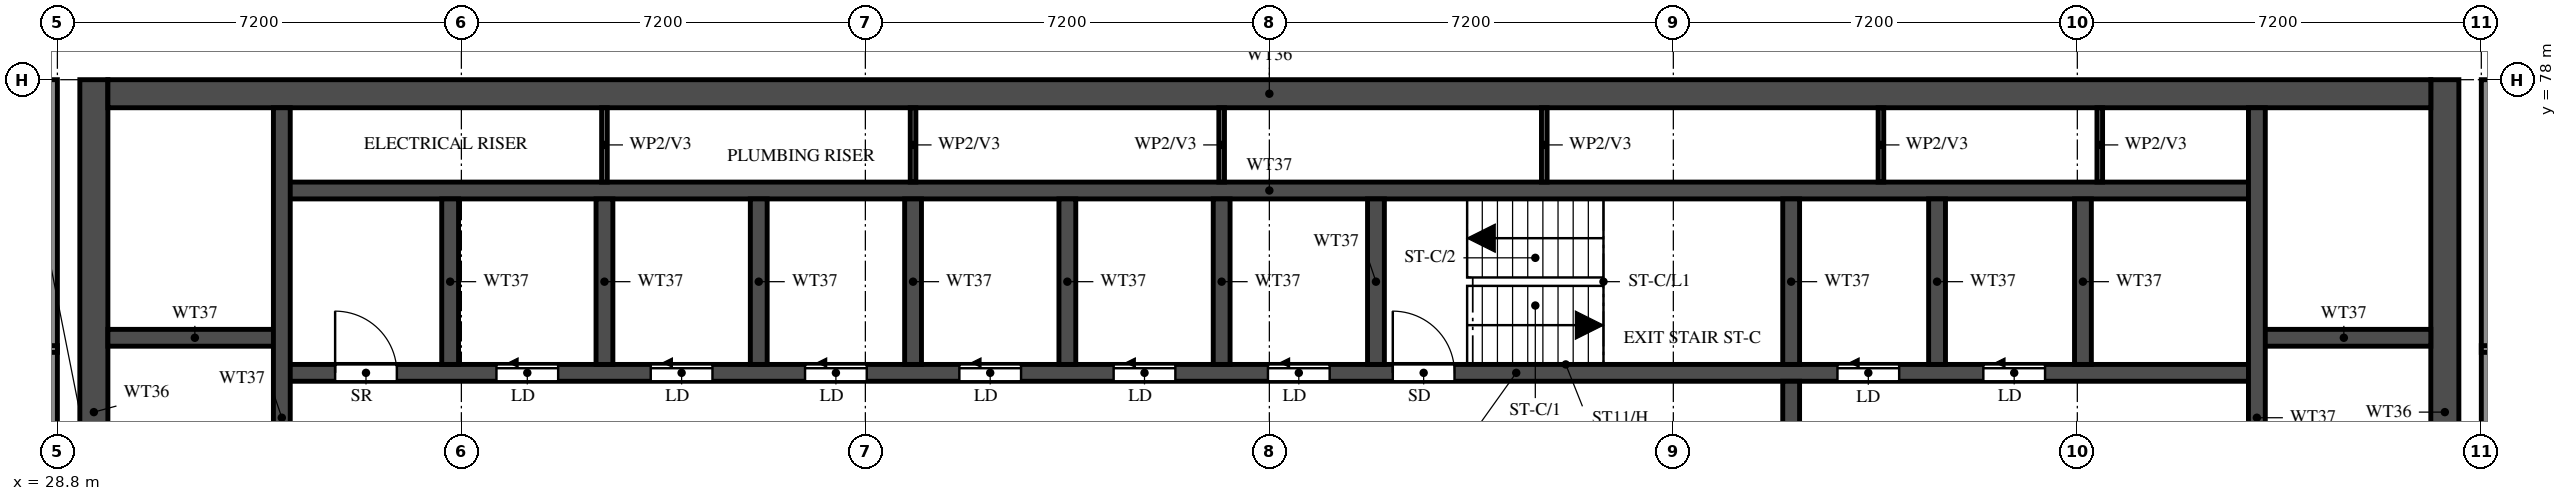
"""IFC4 building model, lengths in metres.
Left out: names, types, materials, properties, quantities, classifications, styles, units other than length and angle.
Written with IfcOpenShell. Run it as: python <this file> out.ifc"""

import sys

from ifc_helpers import new_model, si_unit, direction, frame, frame_2d, origin, place, context, subcontext, project, spatial, rectangle, extrude, element, fill, save


model = new_model("IFC4")
c1 = context("Model", 3, precision=1e-05, world=origin(), true_north=direction((0.0, 1.0)))
c2 = subcontext(c1, "Body", "Model", "MODEL_VIEW")
j1 = project(units=[si_unit("LENGTHUNIT", "METRE"), si_unit("PLANEANGLEUNIT", "RADIAN")], contexts=[c1])
p1 = place(None, origin())
s1 = spatial("IfcSite", under=j1, at=p1, CompositionType="ELEMENT")
p2 = place(p1, origin())
s2 = spatial("IfcBuilding", under=s1, at=p2, CompositionType="ELEMENT")
p3 = place(p2, frame((0.0, 0.0, 257.0)))
s3 = spatial("IfcBuildingStorey", under=s2, at=p3, CompositionType="ELEMENT", Elevation=257.0)
for number, where, z_axis, x_axis in (
    (1, (29.45, 66.15, 0.0), (0.0, 0.0, 1.0), (0.0, 1.0, 0.0)),
    (2, (71.35, 66.15, 0.0), (0.0, 0.0, 1.0), (0.0, 1.0, 0.0)),
):
    element("IfcWall", number, at=place(p3, frame(where, z_axis=z_axis, x_axis=x_axis)), inside=s3, PredefinedType="SHEAR", context=c2, shape_type="SweptSolid", body=[
        extrude(rectangle(XDim=11.85, YDim=0.5, at=frame_2d((5.925, 0.0))), origin(), (0.0, 0.0, 1.0), 3.22),
    ])
p4 = place(p3, frame((29.7, 77.75, 0.0), z_axis=(0.0, 0.0, 1.0), x_axis=(1.0, 0.0, 0.0)))
e3 = element("IfcWall", 3, at=p4, inside=s3, PredefinedType="SHEAR", context=c2, shape_type="SweptSolid", body=[
    extrude(rectangle(XDim=41.4, YDim=0.5, at=frame_2d((20.7, 0.0))), origin(), (0.0, 0.0, 1.0), 3.22),
])
p5 = place(p3, frame((32.8, 72.775, 0.0), z_axis=(0.0, 0.0, 1.0), x_axis=(1.0, 0.0, 0.0)))
e4 = element("IfcWall", 4, at=p5, inside=s3, PredefinedType="SHEAR", context=c2, shape_type="SweptSolid", body=[
    extrude(rectangle(XDim=35.2, YDim=0.3, at=frame_2d((17.6, 0.0))), origin(), (0.0, 0.0, 1.0), 3.22),
])
p6 = place(p5, frame((19.8, 0.0, 0.0)))
e5 = element("IfcOpeningElement", 5, at=p6, cuts=e4, PredefinedType="OPENING", context=c2, shape_type="SweptSolid", body=[
    extrude(rectangle(XDim=1.1, YDim=2.1, at=frame_2d((0.55, 1.05))), frame((0.0, 0.16, 0.0), z_axis=(0.0, -1.0, 0.0), x_axis=(1.0, 0.0, 0.0)), (0.0, 0.0, 1.0), 0.32),
])
p7 = place(p5, frame((27.725, 0.0, 0.0)))
e6 = element("IfcOpeningElement", 6, at=p7, cuts=e4, PredefinedType="OPENING", context=c2, shape_type="SweptSolid", body=[
    extrude(rectangle(XDim=1.1, YDim=2.1, at=frame_2d((0.55, 1.05))), frame((0.0, 0.16, 0.0), z_axis=(0.0, -1.0, 0.0), x_axis=(1.0, 0.0, 0.0)), (0.0, 0.0, 1.0), 0.32),
])
p8 = place(p5, frame((30.325, 0.0, 0.0)))
e7 = element("IfcOpeningElement", 7, at=p8, cuts=e4, PredefinedType="OPENING", context=c2, shape_type="SweptSolid", body=[
    extrude(rectangle(XDim=1.1, YDim=2.1, at=frame_2d((0.55, 1.05))), frame((0.0, 0.16, 0.0), z_axis=(0.0, -1.0, 0.0), x_axis=(1.0, 0.0, 0.0)), (0.0, 0.0, 1.0), 0.32),
])
p9 = place(p5, frame((3.825, 0.0, 0.0)))
e8 = element("IfcOpeningElement", 8, at=p9, cuts=e4, PredefinedType="OPENING", context=c2, shape_type="SweptSolid", body=[
    extrude(rectangle(XDim=1.1, YDim=2.1, at=frame_2d((0.55, 1.05))), frame((0.0, 0.16, 0.0), z_axis=(0.0, -1.0, 0.0), x_axis=(1.0, 0.0, 0.0)), (0.0, 0.0, 1.0), 0.32),
])
p10 = place(p5, frame((6.575, 0.0, 0.0)))
e9 = element("IfcOpeningElement", 9, at=p10, cuts=e4, PredefinedType="OPENING", context=c2, shape_type="SweptSolid", body=[
    extrude(rectangle(XDim=1.1, YDim=2.1, at=frame_2d((0.55, 1.05))), frame((0.0, 0.16, 0.0), z_axis=(0.0, -1.0, 0.0), x_axis=(1.0, 0.0, 0.0)), (0.0, 0.0, 1.0), 0.32),
])
p11 = place(p5, frame((9.325, 0.0, 0.0)))
e10 = element("IfcOpeningElement", 10, at=p11, cuts=e4, PredefinedType="OPENING", context=c2, shape_type="SweptSolid", body=[
    extrude(rectangle(XDim=1.1, YDim=2.1, at=frame_2d((0.55, 1.05))), frame((0.0, 0.16, 0.0), z_axis=(0.0, -1.0, 0.0), x_axis=(1.0, 0.0, 0.0)), (0.0, 0.0, 1.0), 0.32),
])
p12 = place(p5, frame((12.075, 0.0, 0.0)))
e11 = element("IfcOpeningElement", 11, at=p12, cuts=e4, PredefinedType="OPENING", context=c2, shape_type="SweptSolid", body=[
    extrude(rectangle(XDim=1.1, YDim=2.1, at=frame_2d((0.55, 1.05))), frame((0.0, 0.16, 0.0), z_axis=(0.0, -1.0, 0.0), x_axis=(1.0, 0.0, 0.0)), (0.0, 0.0, 1.0), 0.32),
])
p13 = place(p5, frame((14.825, 0.0, 0.0)))
e12 = element("IfcOpeningElement", 12, at=p13, cuts=e4, PredefinedType="OPENING", context=c2, shape_type="SweptSolid", body=[
    extrude(rectangle(XDim=1.1, YDim=2.1, at=frame_2d((0.55, 1.05))), frame((0.0, 0.16, 0.0), z_axis=(0.0, -1.0, 0.0), x_axis=(1.0, 0.0, 0.0)), (0.0, 0.0, 1.0), 0.32),
])
p14 = place(p5, frame((17.575, 0.0, 0.0)))
e13 = element("IfcOpeningElement", 13, at=p14, cuts=e4, PredefinedType="OPENING", context=c2, shape_type="SweptSolid", body=[
    extrude(rectangle(XDim=1.1, YDim=2.1, at=frame_2d((0.55, 1.05))), frame((0.0, 0.16, 0.0), z_axis=(0.0, -1.0, 0.0), x_axis=(1.0, 0.0, 0.0)), (0.0, 0.0, 1.0), 0.32),
])
p15 = place(p5, frame((0.95, 0.0, 0.0)))
e14 = element("IfcOpeningElement", 14, at=p15, cuts=e4, PredefinedType="OPENING", context=c2, shape_type="SweptSolid", body=[
    extrude(rectangle(XDim=1.1, YDim=2.1, at=frame_2d((0.55, 1.05))), frame((0.0, 0.16, 0.0), z_axis=(0.0, -1.0, 0.0), x_axis=(1.0, 0.0, 0.0)), (0.0, 0.0, 1.0), 0.32),
])
p16 = place(p3, frame((32.8, 76.025, 0.0), z_axis=(0.0, 0.0, 1.0), x_axis=(1.0, 0.0, 0.0)))
e15 = element("IfcWall", 15, at=p16, inside=s3, PredefinedType="SHEAR", context=c2, shape_type="SweptSolid", body=[
    extrude(rectangle(XDim=35.2, YDim=0.3, at=frame_2d((17.6, 0.0))), origin(), (0.0, 0.0, 1.0), 3.22),
])
for number, where, z_axis, x_axis in (
    (16, (29.7, 73.4, 0.0), (0.0, 0.0, 1.0), (1.0, 0.0, 0.0)),
    (17, (68.0, 73.4, 0.0), (0.0, 0.0, 1.0), (1.0, 0.0, 0.0)),
):
    element("IfcWall", number, at=place(p3, frame(where, z_axis=z_axis, x_axis=x_axis)), inside=s3, PredefinedType="SHEAR", context=c2, shape_type="SweptSolid", body=[
        extrude(rectangle(XDim=3.1, YDim=0.3, at=frame_2d((1.55, 0.0))), origin(), (0.0, 0.0, 1.0), 3.22),
    ])
p17 = place(p3, frame((32.8, 66.45, 0.0), z_axis=(0.0, 0.0, 1.0), x_axis=(0.0, 1.0, 0.0)))
e18 = element("IfcWall", 18, at=p17, inside=s3, PredefinedType="SHEAR", context=c2, shape_type="SweptSolid", body=[
    extrude(rectangle(XDim=11.05, YDim=0.3, at=frame_2d((5.525, 0.0))), origin(), (0.0, 0.0, 1.0), 3.22),
])
p18 = place(p3, frame((68.0, 66.45, 0.0), z_axis=(0.0, 0.0, 1.0), x_axis=(0.0, 1.0, 0.0)))
e19 = element("IfcWall", 19, at=p18, inside=s3, PredefinedType="SHEAR", context=c2, shape_type="SweptSolid", body=[
    extrude(rectangle(XDim=11.05, YDim=0.3, at=frame_2d((5.525, 0.0))), origin(), (0.0, 0.0, 1.0), 3.22),
])
p19 = place(p18, frame((0.15, 0.0, 0.0)))
e20 = element("IfcOpeningElement", 20, at=p19, cuts=e19, PredefinedType="OPENING", context=c2, shape_type="SweptSolid", body=[
    extrude(rectangle(XDim=1.1, YDim=2.1, at=frame_2d((0.55, 1.05))), frame((0.0, 0.16, 0.0), z_axis=(0.0, -1.0, 0.0), x_axis=(1.0, 0.0, 0.0)), (0.0, 0.0, 1.0), 0.32),
])
p20 = place(p3, frame((59.7, 66.45, 0.0), z_axis=(0.0, 0.0, 1.0), x_axis=(0.0, 1.0, 0.0)))
e21 = element("IfcWall", 21, at=p20, inside=s3, PredefinedType="SHEAR", context=c2, shape_type="SweptSolid", body=[
    extrude(rectangle(XDim=6.175, YDim=0.3, at=frame_2d((3.087, 0.0))), origin(), (0.0, 0.0, 1.0), 3.22),
])
p21 = place(p20, frame((3.85, 0.0, 0.0)))
e22 = element("IfcOpeningElement", 22, at=p21, cuts=e21, PredefinedType="OPENING", context=c2, shape_type="SweptSolid", body=[
    extrude(rectangle(XDim=1.2, YDim=2.1, at=frame_2d((0.6, 1.05))), frame((0.0, 0.16, 0.0), z_axis=(0.0, -1.0, 0.0), x_axis=(1.0, 0.0, 0.0)), (0.0, 0.0, 1.0), 0.32),
])
for number, where, z_axis, x_axis in (
    (23, (59.7, 72.925, 0.0), (0.0, 0.0, 1.0), (0.0, 1.0, 0.0)),
    (24, (35.8, 72.925, 0.0), (0.0, 0.0, 1.0), (0.0, 1.0, 0.0)),
    (25, (38.55, 72.925, 0.0), (0.0, 0.0, 1.0), (0.0, 1.0, 0.0)),
    (26, (41.3, 72.925, 0.0), (0.0, 0.0, 1.0), (0.0, 1.0, 0.0)),
    (27, (44.05, 72.925, 0.0), (0.0, 0.0, 1.0), (0.0, 1.0, 0.0)),
    (28, (46.8, 72.925, 0.0), (0.0, 0.0, 1.0), (0.0, 1.0, 0.0)),
    (29, (49.55, 72.925, 0.0), (0.0, 0.0, 1.0), (0.0, 1.0, 0.0)),
    (30, (52.3, 72.925, 0.0), (0.0, 0.0, 1.0), (0.0, 1.0, 0.0)),
    (31, (62.3, 72.925, 0.0), (0.0, 0.0, 1.0), (0.0, 1.0, 0.0)),
    (32, (64.9, 72.925, 0.0), (0.0, 0.0, 1.0), (0.0, 1.0, 0.0)),
):
    element("IfcWall", number, at=place(p3, frame(where, z_axis=z_axis, x_axis=x_axis)), inside=s3, PredefinedType="SHEAR", context=c2, shape_type="SweptSolid", body=[
        extrude(rectangle(XDim=2.95, YDim=0.3, at=frame_2d((1.475, 0.0))), origin(), (0.0, 0.0, 1.0), 3.22),
    ])
for number, where, z_axis, x_axis in (
    (33, (38.55, 76.175, 0.0), (0.0, 0.0, 1.0), (0.0, 1.0, 0.0)),
    (34, (44.05, 76.175, 0.0), (0.0, 0.0, 1.0), (0.0, 1.0, 0.0)),
    (35, (49.55, 76.175, 0.0), (0.0, 0.0, 1.0), (0.0, 1.0, 0.0)),
    (36, (55.3, 76.175, 0.0), (0.0, 0.0, 1.0), (0.0, 1.0, 0.0)),
    (37, (61.3, 76.175, 0.0), (0.0, 0.0, 1.0), (0.0, 1.0, 0.0)),
    (38, (65.2, 76.175, 0.0), (0.0, 0.0, 1.0), (0.0, 1.0, 0.0)),
):
    element("IfcWall", number, at=place(p3, frame(where, z_axis=z_axis, x_axis=x_axis)), inside=s3, PredefinedType="PARTITIONING", context=c2, shape_type="SweptSolid", body=[
        extrude(rectangle(XDim=1.325, YDim=0.1, at=frame_2d((0.663, 0.0))), origin(), (0.0, 0.0, 1.0), 3.22),
    ])
for number, where, z_axis, x_axis in (
    (39, (28.7, 62.4, 0.0), (0.0, 0.0, 1.0), (0.0, 1.0, 0.0)),
    (40, (72.1, 62.4, 0.0), (0.0, 0.0, 1.0), (0.0, 1.0, 0.0)),
):
    element("IfcWall", number, at=place(p3, frame(where, z_axis=z_axis, x_axis=x_axis)), inside=s3, PredefinedType="SOLIDWALL", context=c2, shape_type="SweptSolid", body=[
        extrude(rectangle(XDim=15.6, YDim=0.2, at=frame_2d((7.8, 0.0))), origin(), (0.0, 0.0, 1.0), 3.22),
    ])
p22 = place(p3, frame((18.525, 73.2, 0.0), z_axis=(0.0, 0.0, 1.0), x_axis=(1.0, 0.0, 0.0)))
e41 = element("IfcWall", 41, at=p22, inside=s3, PredefinedType="PARTITIONING", context=c2, shape_type="SweptSolid", body=[
    extrude(rectangle(XDim=10.275, YDim=0.12, at=frame_2d((5.138, 0.0))), origin(), (0.0, 0.0, 1.0), 2.32),
])
p23 = place(p22, frame((5.275, 0.0, 0.0)))
e42 = element("IfcOpeningElement", 42, at=p23, cuts=e41, PredefinedType="OPENING", context=c2, shape_type="SweptSolid", body=[
    extrude(rectangle(XDim=0.9, YDim=2.1, at=frame_2d((0.45, 1.05))), frame((0.0, 0.07, 0.0), z_axis=(0.0, -1.0, 0.0), x_axis=(1.0, 0.0, 0.0)), (0.0, 0.0, 1.0), 0.14),
])
p24 = place(p3, frame((72.0, 73.2, 0.0), z_axis=(0.0, 0.0, 1.0), x_axis=(1.0, 0.0, 0.0)))
e43 = element("IfcWall", 43, at=p24, inside=s3, PredefinedType="PARTITIONING", context=c2, shape_type="SweptSolid", body=[
    extrude(rectangle(XDim=10.275, YDim=0.12, at=frame_2d((5.137, 0.0))), origin(), (0.0, 0.0, 1.0), 2.32),
])
p25 = place(p24, frame((4.1, 0.0, 0.0)))
e44 = element("IfcOpeningElement", 44, at=p25, cuts=e43, PredefinedType="OPENING", context=c2, shape_type="SweptSolid", body=[
    extrude(rectangle(XDim=0.9, YDim=2.1, at=frame_2d((0.45, 1.05))), frame((0.0, 0.07, 0.0), z_axis=(0.0, -1.0, 0.0), x_axis=(1.0, 0.0, 0.0)), (0.0, 0.0, 1.0), 0.14),
])
p26 = place(p6, origin())
e45 = element("IfcDoor", 45, at=p26, inside=s3, OperationType="SINGLE_SWING_LEFT", PredefinedType="DOOR", context=c2, shape_type="SweptSolid", body=[
    extrude(rectangle(XDim=1.1, YDim=2.1, at=frame_2d((0.55, 1.05))), frame((0.0, 0.025, 0.0), z_axis=(0.0, -1.0, 0.0), x_axis=(1.0, 0.0, 0.0)), (0.0, 0.0, 1.0), 0.05),
])
fill(e5, e45)
p27 = place(p7, origin())
e46 = element("IfcDoor", 46, at=p27, inside=s3, OperationType="SLIDING_TO_LEFT", PredefinedType="DOOR", context=c2, shape_type="SweptSolid", body=[
    extrude(rectangle(XDim=1.1, YDim=2.1, at=frame_2d((0.55, 1.05))), frame((0.0, 0.025, 0.0), z_axis=(0.0, -1.0, 0.0), x_axis=(1.0, 0.0, 0.0)), (0.0, 0.0, 1.0), 0.05),
])
fill(e6, e46)
p28 = place(p8, origin())
e47 = element("IfcDoor", 47, at=p28, inside=s3, OperationType="SLIDING_TO_LEFT", PredefinedType="DOOR", context=c2, shape_type="SweptSolid", body=[
    extrude(rectangle(XDim=1.1, YDim=2.1, at=frame_2d((0.55, 1.05))), frame((0.0, 0.025, 0.0), z_axis=(0.0, -1.0, 0.0), x_axis=(1.0, 0.0, 0.0)), (0.0, 0.0, 1.0), 0.05),
])
fill(e7, e47)
p29 = place(p9, origin())
e48 = element("IfcDoor", 48, at=p29, inside=s3, OperationType="SLIDING_TO_LEFT", PredefinedType="DOOR", context=c2, shape_type="SweptSolid", body=[
    extrude(rectangle(XDim=1.1, YDim=2.1, at=frame_2d((0.55, 1.05))), frame((0.0, 0.025, 0.0), z_axis=(0.0, -1.0, 0.0), x_axis=(1.0, 0.0, 0.0)), (0.0, 0.0, 1.0), 0.05),
])
fill(e8, e48)
p30 = place(p10, origin())
e49 = element("IfcDoor", 49, at=p30, inside=s3, OperationType="SLIDING_TO_LEFT", PredefinedType="DOOR", context=c2, shape_type="SweptSolid", body=[
    extrude(rectangle(XDim=1.1, YDim=2.1, at=frame_2d((0.55, 1.05))), frame((0.0, 0.025, 0.0), z_axis=(0.0, -1.0, 0.0), x_axis=(1.0, 0.0, 0.0)), (0.0, 0.0, 1.0), 0.05),
])
fill(e9, e49)
p31 = place(p11, origin())
e50 = element("IfcDoor", 50, at=p31, inside=s3, OperationType="SLIDING_TO_LEFT", PredefinedType="DOOR", context=c2, shape_type="SweptSolid", body=[
    extrude(rectangle(XDim=1.1, YDim=2.1, at=frame_2d((0.55, 1.05))), frame((0.0, 0.025, 0.0), z_axis=(0.0, -1.0, 0.0), x_axis=(1.0, 0.0, 0.0)), (0.0, 0.0, 1.0), 0.05),
])
fill(e10, e50)
p32 = place(p12, origin())
e51 = element("IfcDoor", 51, at=p32, inside=s3, OperationType="SLIDING_TO_LEFT", PredefinedType="DOOR", context=c2, shape_type="SweptSolid", body=[
    extrude(rectangle(XDim=1.1, YDim=2.1, at=frame_2d((0.55, 1.05))), frame((0.0, 0.025, 0.0), z_axis=(0.0, -1.0, 0.0), x_axis=(1.0, 0.0, 0.0)), (0.0, 0.0, 1.0), 0.05),
])
fill(e11, e51)
p33 = place(p13, origin())
e52 = element("IfcDoor", 52, at=p33, inside=s3, OperationType="SLIDING_TO_LEFT", PredefinedType="DOOR", context=c2, shape_type="SweptSolid", body=[
    extrude(rectangle(XDim=1.1, YDim=2.1, at=frame_2d((0.55, 1.05))), frame((0.0, 0.025, 0.0), z_axis=(0.0, -1.0, 0.0), x_axis=(1.0, 0.0, 0.0)), (0.0, 0.0, 1.0), 0.05),
])
fill(e12, e52)
p34 = place(p14, origin())
e53 = element("IfcDoor", 53, at=p34, inside=s3, OperationType="SLIDING_TO_LEFT", PredefinedType="DOOR", context=c2, shape_type="SweptSolid", body=[
    extrude(rectangle(XDim=1.1, YDim=2.1, at=frame_2d((0.55, 1.05))), frame((0.0, 0.025, 0.0), z_axis=(0.0, -1.0, 0.0), x_axis=(1.0, 0.0, 0.0)), (0.0, 0.0, 1.0), 0.05),
])
fill(e13, e53)
p35 = place(p15, origin())
e54 = element("IfcDoor", 54, at=p35, inside=s3, OperationType="SINGLE_SWING_LEFT", PredefinedType="DOOR", context=c2, shape_type="SweptSolid", body=[
    extrude(rectangle(XDim=1.1, YDim=2.1, at=frame_2d((0.55, 1.05))), frame((0.0, 0.025, 0.0), z_axis=(0.0, -1.0, 0.0), x_axis=(1.0, 0.0, 0.0)), (0.0, 0.0, 1.0), 0.05),
])
fill(e14, e54)
save(model, sys.argv[1])
